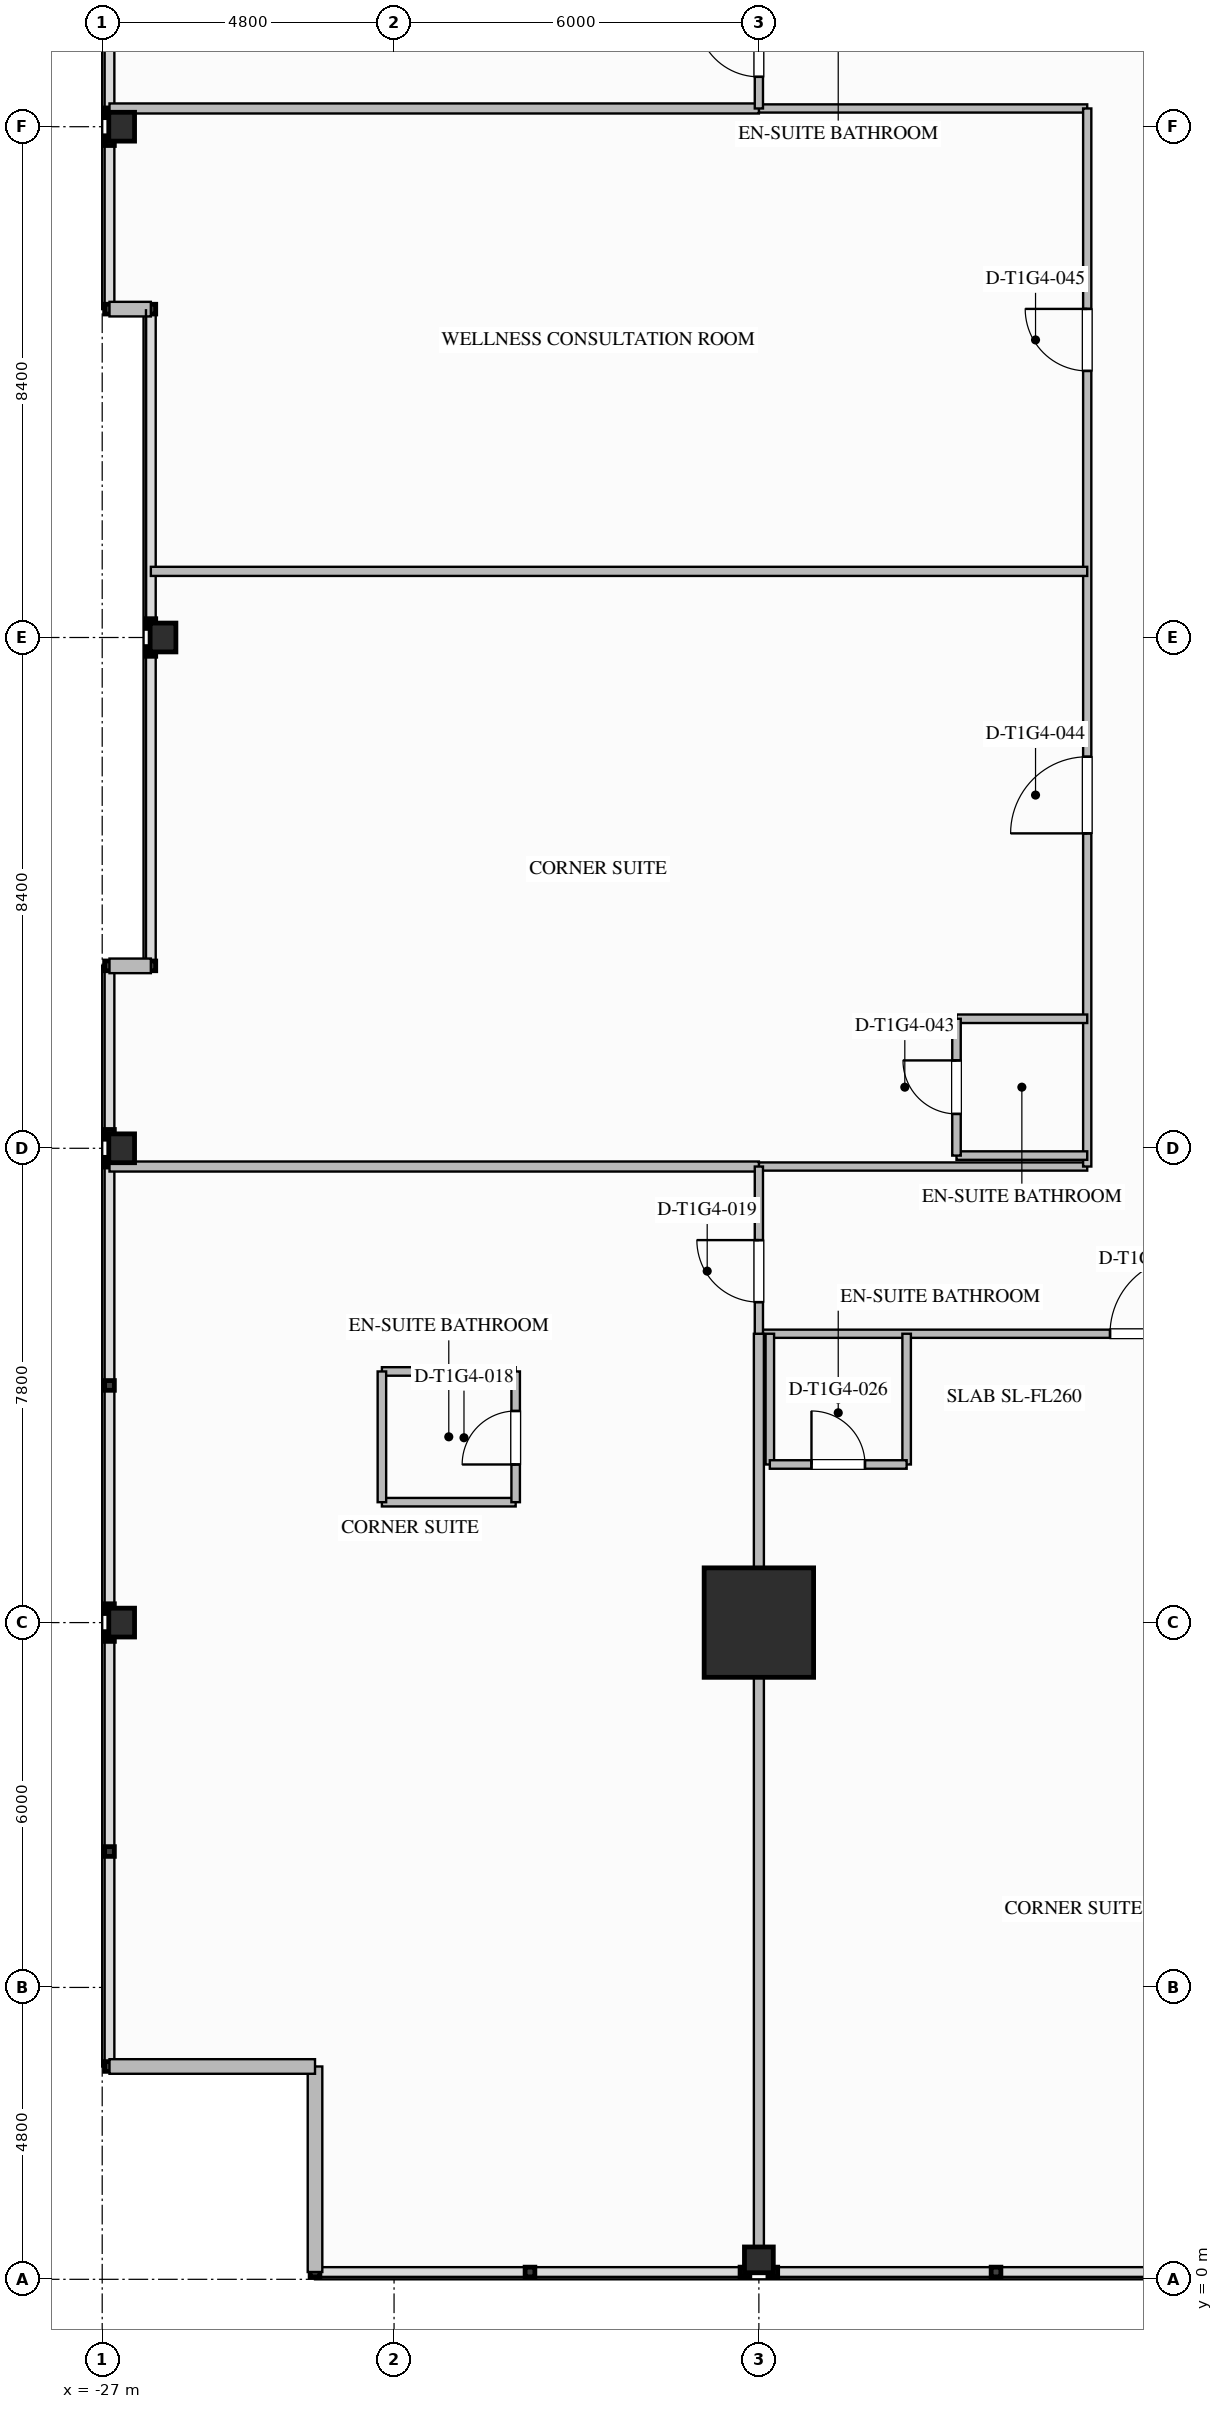
"""IFC4 building model, lengths in metres.
Left out: names, types, materials, properties, quantities, classifications, styles, units other than length and angle.
Written with IfcOpenShell. Run it as: python <this file> out.ifc"""

import sys

from ifc_helpers import new_model, si_unit, direction, frame, frame_2d, origin, origin_2d, place, context, subcontext, project, spatial, rectangle, i_section, extrude, element, fill, save


model = new_model("IFC4")
c1 = context("Model", 3, precision=1e-05, world=origin(), true_north=direction((0.0, 1.0)))
c2 = subcontext(c1, "Body", "Model", "MODEL_VIEW")
j1 = project(units=[si_unit("LENGTHUNIT", "METRE"), si_unit("PLANEANGLEUNIT", "RADIAN")], contexts=[c1])
p1 = place(None, origin())
s1 = spatial("IfcSite", under=j1, at=p1, CompositionType="ELEMENT")
p2 = place(p1, origin())
s2 = spatial("IfcBuilding", under=s1, at=p2, CompositionType="ELEMENT")
p3 = place(p2, frame((0.0, 0.0, 64.7)))
s3 = spatial("IfcBuildingStorey", under=s2, at=p3, CompositionType="ELEMENT", Elevation=64.7)
p4 = place(p3, frame((-16.2, 10.8, 0.0), z_axis=(0.0, 0.0, 1.0), x_axis=(1.0, 0.0, 0.0)))
e1 = element("IfcColumn", 1, at=p4, inside=s3, PredefinedType="COLUMN", context=c2, shape_type="SweptSolid", body=[
    extrude(rectangle(XDim=1.8, YDim=1.8, at=origin_2d()), origin(), (0.0, 0.0, 1.0), 3.5),
])
for number, where, z_axis, x_axis in (
    (2, (-26.68, 10.8, 0.0), (0.0, 0.0, 1.0), (1.0, 0.0, 0.0)),
    (3, (-26.68, 18.6, 0.0), (0.0, 0.0, 1.0), (1.0, 0.0, 0.0)),
    (4, (-26.0, 27.0, 0.0), (0.0, 0.0, 1.0), (1.0, 0.0, 0.0)),
    (5, (-26.68, 35.4, 0.0), (0.0, 0.0, 1.0), (1.0, 0.0, 0.0)),
    (6, (-16.2, 0.32, 0.0), (0.0, 0.0, 1.0), (0.0, 1.0, 0.0)),
):
    element("IfcColumn", number, at=place(p3, frame(where, z_axis=z_axis, x_axis=x_axis)), inside=s3, PredefinedType="COLUMN", context=c2, shape_type="SweptSolid", body=[
        extrude(i_section(OverallWidth=0.424, OverallDepth=0.474, WebThickness=0.048, FlangeThickness=0.077, FilletRadius=0.03, at=origin_2d()), origin(), (0.0, 0.0, 1.0), 3.497),
    ])
for number, where, z_axis, x_axis in (
    (7, (-23.5, 0.12, 0.0), (0.0, 0.0, 1.0), (0.0, 1.0, 0.0)),
    (8, (-23.5, 3.5, 0.0), (0.0, 0.0, 1.0), (-1.0, 0.0, 0.0)),
):
    element("IfcWall", number, at=place(p3, frame(where, z_axis=z_axis, x_axis=x_axis)), inside=s3, PredefinedType="STANDARD", context=c2, shape_type="SweptSolid", body=[
        extrude(rectangle(XDim=3.38, YDim=0.24, at=frame_2d((1.69, 0.0))), origin(), (0.0, 0.0, 1.0), 3.24),
    ])
for number, where, z_axis, x_axis in (
    (9, (-26.88, 21.6, 0.0), (0.0, 0.0, 1.0), (1.0, 0.0, 0.0)),
    (10, (-26.2, 32.4, 0.0), (0.0, 0.0, 1.0), (-1.0, 0.0, 0.0)),
):
    element("IfcWall", number, at=place(p3, frame(where, z_axis=z_axis, x_axis=x_axis)), inside=s3, PredefinedType="STANDARD", context=c2, shape_type="SweptSolid", body=[
        extrude(rectangle(XDim=0.68, YDim=0.24, at=frame_2d((0.34, 0.0))), origin(), (0.0, 0.0, 1.0), 3.24),
    ])
p5 = place(p3, frame((-16.2, 15.55, 0.0), z_axis=(0.0, 0.0, 1.0), x_axis=(1.0, 0.0, 0.0)))
e11 = element("IfcWall", 11, at=p5, inside=s3, PredefinedType="PARTITIONING", context=c2, shape_type="SweptSolid", body=[
    extrude(rectangle(XDim=32.4, YDim=0.135, at=frame_2d((16.2, 0.0))), origin(), (0.0, 0.0, 1.0), 3.24),
])
p6 = place(p5, frame((5.775, 0.0, 0.0)))
e12 = element("IfcOpeningElement", 12, at=p6, cuts=e11, PredefinedType="OPENING", context=c2, shape_type="SweptSolid", body=[
    extrude(rectangle(XDim=1.26, YDim=2.2, at=frame_2d((0.63, 1.1))), frame((0.0, 0.077, 0.0), z_axis=(0.0, -1.0, 0.0), x_axis=(1.0, 0.0, 0.0)), (0.0, 0.0, 1.0), 0.155),
])
p7 = place(p5, frame((17.286, 0.0, 0.0)))
e13 = element("IfcOpeningElement", 13, at=p7, cuts=e11, PredefinedType="OPENING", context=c2, shape_type="SweptSolid", body=[
    extrude(rectangle(XDim=1.26, YDim=2.2, at=frame_2d((0.63, 1.1))), frame((0.0, 0.077, 0.0), z_axis=(0.0, -1.0, 0.0), x_axis=(1.0, 0.0, 0.0)), (0.0, 0.0, 1.0), 0.155),
])
p8 = place(p5, frame((28.295, 0.0, 0.0)))
e14 = element("IfcOpeningElement", 14, at=p8, cuts=e11, PredefinedType="OPENING", context=c2, shape_type="SweptSolid", body=[
    extrude(rectangle(XDim=1.26, YDim=2.2, at=frame_2d((0.63, 1.1))), frame((0.0, 0.077, 0.0), z_axis=(0.0, -1.0, 0.0), x_axis=(1.0, 0.0, 0.0)), (0.0, 0.0, 1.0), 0.155),
])
for number, where, z_axis, x_axis in (
    (15, (-16.2, 18.3, 0.0), (0.0, 0.0, 1.0), (1.0, 0.0, 0.0)),
    (16, (-16.2, 35.7, 0.0), (0.0, 0.0, 1.0), (1.0, 0.0, 0.0)),
):
    element("IfcWall", number, at=place(p3, frame(where, z_axis=z_axis, x_axis=x_axis)), inside=s3, PredefinedType="PARTITIONING", context=c2, shape_type="SweptSolid", body=[
        extrude(rectangle(XDim=5.4, YDim=0.135, at=frame_2d((2.7, 0.0))), origin(), (0.0, 0.0, 1.0), 3.24),
    ])
p9 = place(p3, frame((-10.8, 18.3, 0.0), z_axis=(0.0, 0.0, 1.0), x_axis=(0.0, 1.0, 0.0)))
e17 = element("IfcWall", 17, at=p9, inside=s3, PredefinedType="PARTITIONING", context=c2, shape_type="SweptSolid", body=[
    extrude(rectangle(XDim=17.4, YDim=0.135, at=frame_2d((8.7, 0.0))), origin(), (0.0, 0.0, 1.0), 3.24),
])
p10 = place(p9, frame((5.479, 0.0, 0.0)))
e18 = element("IfcOpeningElement", 18, at=p10, cuts=e17, PredefinedType="OPENING", context=c2, shape_type="SweptSolid", body=[
    extrude(rectangle(XDim=1.26, YDim=2.2, at=frame_2d((0.63, 1.1))), frame((0.0, 0.077, 0.0), z_axis=(0.0, -1.0, 0.0), x_axis=(1.0, 0.0, 0.0)), (0.0, 0.0, 1.0), 0.155),
])
p11 = place(p9, frame((13.084, 0.0, 0.0)))
e19 = element("IfcOpeningElement", 19, at=p11, cuts=e17, PredefinedType="OPENING", context=c2, shape_type="SweptSolid", body=[
    extrude(rectangle(XDim=1.02, YDim=2.15, at=frame_2d((0.51, 1.075))), frame((0.0, 0.077, 0.0), z_axis=(0.0, -1.0, 0.0), x_axis=(1.0, 0.0, 0.0)), (0.0, 0.0, 1.0), 0.155),
])
p12 = place(p3, frame((-16.2, 0.12, 0.0), z_axis=(0.0, 0.0, 1.0), x_axis=(0.0, 1.0, 0.0)))
e20 = element("IfcWall", 20, at=p12, inside=s3, PredefinedType="PARTITIONING", context=c2, shape_type="SweptSolid", body=[
    extrude(rectangle(XDim=15.43, YDim=0.165, at=frame_2d((7.715, 0.0))), origin(), (0.0, 0.0, 1.0), 2.452),
])
for number, where, z_axis, x_axis in (
    (21, (-26.88, 18.3, 0.0), (0.0, 0.0, 1.0), (1.0, 0.0, 0.0)),
    (22, (-26.88, 35.7, 0.0), (0.0, 0.0, 1.0), (1.0, 0.0, 0.0)),
):
    element("IfcWall", number, at=place(p3, frame(where, z_axis=z_axis, x_axis=x_axis)), inside=s3, PredefinedType="PARTITIONING", context=c2, shape_type="SweptSolid", body=[
        extrude(rectangle(XDim=10.68, YDim=0.165, at=frame_2d((5.34, 0.0))), origin(), (0.0, 0.0, 1.0), 2.452),
    ])
p13 = place(p3, frame((-16.2, 15.55, 0.0), z_axis=(0.0, 0.0, 1.0), x_axis=(0.0, 1.0, 0.0)))
e23 = element("IfcWall", 23, at=p13, inside=s3, PredefinedType="PARTITIONING", context=c2, shape_type="SweptSolid", body=[
    extrude(rectangle(XDim=2.75, YDim=0.135, at=frame_2d((1.375, 0.0))), origin(), (0.0, 0.0, 1.0), 2.452),
])
p14 = place(p13, frame((0.52, 0.0, 0.0)))
e24 = element("IfcOpeningElement", 24, at=p14, cuts=e23, PredefinedType="OPENING", context=c2, shape_type="SweptSolid", body=[
    extrude(rectangle(XDim=1.02, YDim=2.15, at=frame_2d((0.51, 1.075))), frame((0.0, 0.077, 0.0), z_axis=(0.0, -1.0, 0.0), x_axis=(1.0, 0.0, 0.0)), (0.0, 0.0, 1.0), 0.155),
])
p15 = place(p3, frame((-16.2, 35.7, 0.0), z_axis=(0.0, 0.0, 1.0), x_axis=(0.0, 1.0, 0.0)))
e25 = element("IfcWall", 25, at=p15, inside=s3, PredefinedType="PARTITIONING", context=c2, shape_type="SweptSolid", body=[
    extrude(rectangle(XDim=2.75, YDim=0.135, at=frame_2d((1.375, 0.0))), origin(), (0.0, 0.0, 1.0), 2.452),
])
p16 = place(p15, frame((0.52, 0.0, 0.0)))
e26 = element("IfcOpeningElement", 26, at=p16, cuts=e25, PredefinedType="OPENING", context=c2, shape_type="SweptSolid", body=[
    extrude(rectangle(XDim=1.02, YDim=2.15, at=frame_2d((0.51, 1.075))), frame((0.0, 0.077, 0.0), z_axis=(0.0, -1.0, 0.0), x_axis=(1.0, 0.0, 0.0)), (0.0, 0.0, 1.0), 0.155),
])
for number, where, z_axis, x_axis in (
    (27, (-22.4, 12.78, 0.0), (0.0, 0.0, 1.0), (1.0, 0.0, 0.0)),
    (28, (-22.4, 14.93, 0.0), (0.0, 0.0, 1.0), (1.0, 0.0, 0.0)),
):
    element("IfcWall", number, at=place(p3, frame(where, z_axis=z_axis, x_axis=x_axis)), inside=s3, PredefinedType="PLUMBINGWALL", context=c2, shape_type="SweptSolid", body=[
        extrude(rectangle(XDim=2.2, YDim=0.14, at=frame_2d((1.1, 0.0))), origin(), (0.0, 0.0, 1.0), 3.24),
    ])
p17 = place(p3, frame((-22.4, 12.78, 0.0), z_axis=(0.0, 0.0, 1.0), x_axis=(0.0, 1.0, 0.0)))
e29 = element("IfcWall", 29, at=p17, inside=s3, PredefinedType="PLUMBINGWALL", context=c2, shape_type="SweptSolid", body=[
    extrude(rectangle(XDim=2.15, YDim=0.14, at=frame_2d((1.075, 0.0))), origin(), (0.0, 0.0, 1.0), 3.24),
])
p18 = place(p3, frame((-20.2, 12.78, 0.0), z_axis=(0.0, 0.0, 1.0), x_axis=(0.0, 1.0, 0.0)))
e30 = element("IfcWall", 30, at=p18, inside=s3, PredefinedType="PLUMBINGWALL", context=c2, shape_type="SweptSolid", body=[
    extrude(rectangle(XDim=2.15, YDim=0.14, at=frame_2d((1.075, 0.0))), origin(), (0.0, 0.0, 1.0), 3.24),
])
p19 = place(p18, frame((0.62, 0.0, 0.0)))
e31 = element("IfcOpeningElement", 31, at=p19, cuts=e30, PredefinedType="OPENING", context=c2, shape_type="SweptSolid", body=[
    extrude(rectangle(XDim=0.88, YDim=2.1, at=frame_2d((0.44, 1.05))), frame((0.0, 0.08, 0.0), z_axis=(0.0, -1.0, 0.0), x_axis=(1.0, 0.0, 0.0)), (0.0, 0.0, 1.0), 0.16),
])
p20 = place(p3, frame((-16.02, 15.55, 0.0), z_axis=(0.0, 0.0, 1.0), x_axis=(0.0, -1.0, 0.0)))
e32 = element("IfcWall", 32, at=p20, inside=s3, PredefinedType="PLUMBINGWALL", context=c2, shape_type="SweptSolid", body=[
    extrude(rectangle(XDim=2.15, YDim=0.14, at=frame_2d((1.075, 0.0))), origin(), (0.0, 0.0, 1.0), 2.452),
])
p21 = place(p3, frame((-13.77, 15.55, 0.0), z_axis=(0.0, 0.0, 1.0), x_axis=(0.0, -1.0, 0.0)))
e33 = element("IfcWall", 33, at=p21, inside=s3, PredefinedType="PLUMBINGWALL", context=c2, shape_type="SweptSolid", body=[
    extrude(rectangle(XDim=2.15, YDim=0.14, at=frame_2d((1.075, 0.0))), origin(), (0.0, 0.0, 1.0), 3.24),
])
p22 = place(p3, frame((-16.02, 13.4, 0.0), z_axis=(0.0, 0.0, 1.0), x_axis=(1.0, 0.0, 0.0)))
e34 = element("IfcWall", 34, at=p22, inside=s3, PredefinedType="PLUMBINGWALL", context=c2, shape_type="SweptSolid", body=[
    extrude(rectangle(XDim=2.25, YDim=0.14, at=frame_2d((1.125, 0.0))), origin(), (0.0, 0.0, 1.0), 3.24),
])
p23 = place(p22, frame((0.685, 0.0, 0.0)))
e35 = element("IfcOpeningElement", 35, at=p23, cuts=e34, PredefinedType="OPENING", context=c2, shape_type="SweptSolid", body=[
    extrude(rectangle(XDim=0.88, YDim=2.1, at=frame_2d((0.44, 1.05))), frame((0.0, 0.08, 0.0), z_axis=(0.0, -1.0, 0.0), x_axis=(1.0, 0.0, 0.0)), (0.0, 0.0, 1.0), 0.16),
])
p24 = place(p3, frame((-10.8, 18.48, 0.0), z_axis=(0.0, 0.0, 1.0), x_axis=(-1.0, 0.0, 0.0)))
e36 = element("IfcWall", 36, at=p24, inside=s3, PredefinedType="PLUMBINGWALL", context=c2, shape_type="SweptSolid", body=[
    extrude(rectangle(XDim=2.15, YDim=0.14, at=frame_2d((1.075, 0.0))), origin(), (0.0, 0.0, 1.0), 2.617),
])
p25 = place(p3, frame((-10.8, 20.73, 0.0), z_axis=(0.0, 0.0, 1.0), x_axis=(-1.0, 0.0, 0.0)))
e37 = element("IfcWall", 37, at=p25, inside=s3, PredefinedType="PLUMBINGWALL", context=c2, shape_type="SweptSolid", body=[
    extrude(rectangle(XDim=2.15, YDim=0.14, at=frame_2d((1.075, 0.0))), origin(), (0.0, 0.0, 1.0), 3.24),
])
p26 = place(p3, frame((-12.95, 18.48, 0.0), z_axis=(0.0, 0.0, 1.0), x_axis=(0.0, 1.0, 0.0)))
e38 = element("IfcWall", 38, at=p26, inside=s3, PredefinedType="PLUMBINGWALL", context=c2, shape_type="SweptSolid", body=[
    extrude(rectangle(XDim=2.25, YDim=0.14, at=frame_2d((1.125, 0.0))), origin(), (0.0, 0.0, 1.0), 3.24),
])
p27 = place(p26, frame((0.685, 0.0, 0.0)))
e39 = element("IfcOpeningElement", 39, at=p27, cuts=e38, PredefinedType="OPENING", context=c2, shape_type="SweptSolid", body=[
    extrude(rectangle(XDim=0.88, YDim=2.1, at=frame_2d((0.44, 1.05))), frame((0.0, 0.08, 0.0), z_axis=(0.0, -1.0, 0.0), x_axis=(1.0, 0.0, 0.0)), (0.0, 0.0, 1.0), 0.16),
])
p28 = place(p3, frame((-26.2, 28.087, 0.0), z_axis=(0.0, 0.0, 1.0), x_axis=(1.0, 0.0, 0.0)))
e40 = element("IfcWall", 40, at=p28, inside=s3, PredefinedType="PARTITIONING", context=c2, shape_type="SweptSolid", body=[
    extrude(rectangle(XDim=15.4, YDim=0.15, at=frame_2d((7.7, 0.0))), origin(), (0.0, 0.0, 1.0), 3.24),
])
p29 = place(p19, origin())
e41 = element("IfcDoor", 41, at=p29, inside=s3, OperationType="SINGLE_SWING_LEFT", PredefinedType="DOOR", context=c2, shape_type="SweptSolid", body=[
    extrude(rectangle(XDim=0.88, YDim=2.1, at=frame_2d((0.44, 1.05))), frame((0.0, 0.025, 0.0), z_axis=(0.0, -1.0, 0.0), x_axis=(1.0, 0.0, 0.0)), (0.0, 0.0, 1.0), 0.05),
])
fill(e31, e41)
p30 = place(p14, origin())
e42 = element("IfcDoor", 42, at=p30, inside=s3, OperationType="SINGLE_SWING_RIGHT", PredefinedType="DOOR", context=c2, shape_type="SweptSolid", body=[
    extrude(rectangle(XDim=1.02, YDim=2.15, at=frame_2d((0.51, 1.075))), frame((0.0, 0.025, 0.0), z_axis=(0.0, -1.0, 0.0), x_axis=(1.0, 0.0, 0.0)), (0.0, 0.0, 1.0), 0.05),
])
fill(e24, e42)
p31 = place(p16, origin())
e43 = element("IfcDoor", 43, at=p31, inside=s3, OperationType="SINGLE_SWING_RIGHT", PredefinedType="DOOR", context=c2, shape_type="SweptSolid", body=[
    extrude(rectangle(XDim=1.02, YDim=2.15, at=frame_2d((0.51, 1.075))), frame((0.0, 0.025, 0.0), z_axis=(0.0, -1.0, 0.0), x_axis=(1.0, 0.0, 0.0)), (0.0, 0.0, 1.0), 0.05),
])
fill(e26, e43)
p32 = place(p23, origin())
e44 = element("IfcDoor", 44, at=p32, inside=s3, OperationType="SINGLE_SWING_LEFT", PredefinedType="DOOR", context=c2, shape_type="SweptSolid", body=[
    extrude(rectangle(XDim=0.88, YDim=2.1, at=frame_2d((0.44, 1.05))), frame((0.0, 0.025, 0.0), z_axis=(0.0, -1.0, 0.0), x_axis=(1.0, 0.0, 0.0)), (0.0, 0.0, 1.0), 0.05),
])
fill(e35, e44)
p33 = place(p6, origin())
e45 = element("IfcDoor", 45, at=p33, inside=s3, OperationType="SINGLE_SWING_RIGHT", PredefinedType="DOOR", context=c2, shape_type="SweptSolid", body=[
    extrude(rectangle(XDim=1.26, YDim=2.2, at=frame_2d((0.63, 1.1))), frame((0.0, 0.025, 0.0), z_axis=(0.0, -1.0, 0.0), x_axis=(1.0, 0.0, 0.0)), (0.0, 0.0, 1.0), 0.05),
])
fill(e12, e45)
p34 = place(p27, origin())
e46 = element("IfcDoor", 46, at=p34, inside=s3, OperationType="SINGLE_SWING_RIGHT", PredefinedType="DOOR", context=c2, shape_type="SweptSolid", body=[
    extrude(rectangle(XDim=0.88, YDim=2.1, at=frame_2d((0.44, 1.05))), frame((0.0, 0.025, 0.0), z_axis=(0.0, -1.0, 0.0), x_axis=(1.0, 0.0, 0.0)), (0.0, 0.0, 1.0), 0.05),
])
fill(e39, e46)
p35 = place(p10, origin())
e47 = element("IfcDoor", 47, at=p35, inside=s3, OperationType="SINGLE_SWING_LEFT", PredefinedType="DOOR", context=c2, shape_type="SweptSolid", body=[
    extrude(rectangle(XDim=1.26, YDim=2.2, at=frame_2d((0.63, 1.1))), frame((0.0, 0.025, 0.0), z_axis=(0.0, -1.0, 0.0), x_axis=(1.0, 0.0, 0.0)), (0.0, 0.0, 1.0), 0.05),
])
fill(e18, e47)
p36 = place(p11, origin())
e48 = element("IfcDoor", 48, at=p36, inside=s3, OperationType="SINGLE_SWING_RIGHT", PredefinedType="DOOR", context=c2, shape_type="SweptSolid", body=[
    extrude(rectangle(XDim=1.02, YDim=2.15, at=frame_2d((0.51, 1.075))), frame((0.0, 0.025, 0.0), z_axis=(0.0, -1.0, 0.0), x_axis=(1.0, 0.0, 0.0)), (0.0, 0.0, 1.0), 0.05),
])
fill(e19, e48)
save(model, sys.argv[1])
